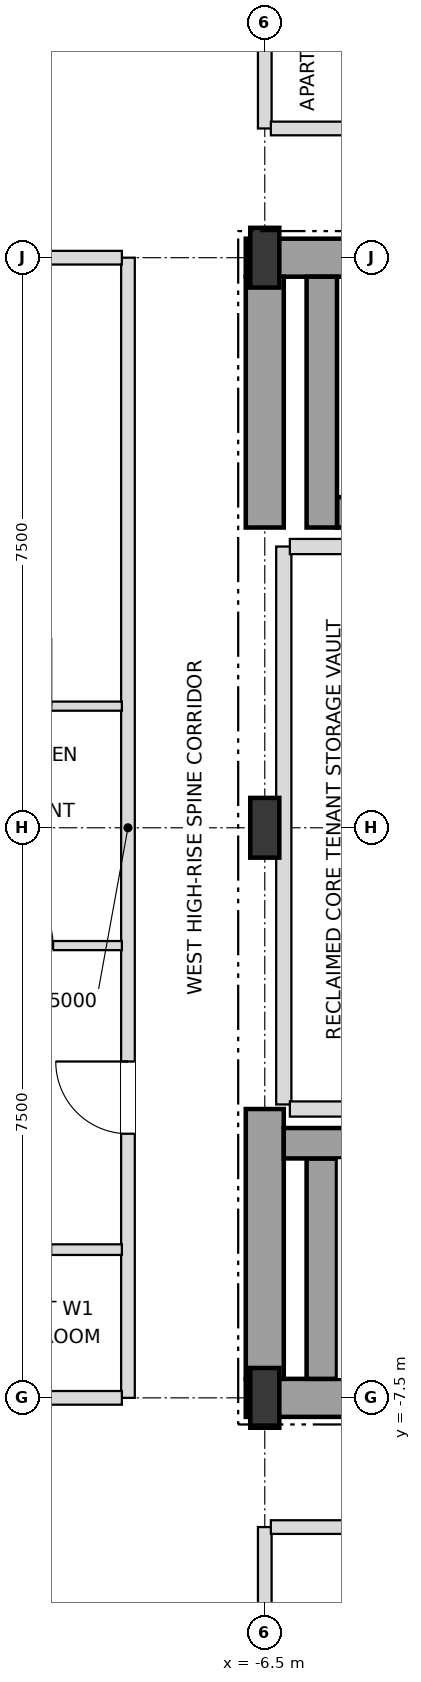
"""IFC4 building model, lengths in metres.
Left out: names, types, materials, properties, quantities, classifications, styles, units other than length and angle.
Written with IfcOpenShell. Run it as: python <this file> out.ifc"""

import sys

from ifc_helpers import new_model, si_unit, direction, frame, frame_2d, origin, origin_2d, place, context, subcontext, project, spatial, rectangle, i_section, extrude, element, fill, save


model = new_model("IFC4")
c1 = context("Model", 3, precision=1e-05, world=origin(), true_north=direction((0.0, 1.0)))
c2 = subcontext(c1, "Body", "Model", "MODEL_VIEW")
j1 = project(units=[si_unit("LENGTHUNIT", "METRE"), si_unit("PLANEANGLEUNIT", "RADIAN")], contexts=[c1])
p1 = place(None, origin())
s1 = spatial("IfcSite", under=j1, at=p1, CompositionType="ELEMENT")
p2 = place(p1, origin())
s2 = spatial("IfcBuilding", under=s1, at=p2, CompositionType="ELEMENT")
p3 = place(p2, frame((0.0, 0.0, 254.7)))
s3 = spatial("IfcBuildingStorey", under=s2, at=p3, CompositionType="ELEMENT", Elevation=254.7)
for number, where, z_axis, x_axis in (
    (1, (-6.5, -7.5, 0.0), (0.0, 0.0, 1.0), (1.0, 0.0, 0.0)),
    (2, (-6.5, 0.0, 0.0), (0.0, 0.0, 1.0), (1.0, 0.0, 0.0)),
    (3, (-6.5, 7.5, 0.0), (0.0, 0.0, 1.0), (1.0, 0.0, 0.0)),
):
    element("IfcColumn", number, at=place(p3, frame(where, z_axis=z_axis, x_axis=x_axis)), inside=s3, PredefinedType="COLUMN", context=c2, shape_type="SweptSolid", body=[
        extrude(i_section(OverallWidth=0.382, OverallDepth=0.786, WebThickness=0.02, FlangeThickness=0.033, at=origin_2d()), origin(), (0.0, 0.0, 1.0), 3.6),
    ])
p4 = place(p3, frame((-6.75, -7.5, 0.0), z_axis=(0.0, 0.0, 1.0), x_axis=(1.0, 0.0, 0.0)))
e4 = element("IfcWall", 4, at=p4, inside=s3, PredefinedType="SHEAR", context=c2, shape_type="SweptSolid", body=[
    extrude(rectangle(XDim=6.75, YDim=0.5, at=frame_2d((3.375, 0.0))), origin(), (0.0, 0.0, 1.0), 3.38),
])
p5 = place(p3, frame((-6.75, 7.5, 0.0), z_axis=(0.0, 0.0, 1.0), x_axis=(1.0, 0.0, 0.0)))
e5 = element("IfcWall", 5, at=p5, inside=s3, PredefinedType="SHEAR", context=c2, shape_type="SweptSolid", body=[
    extrude(rectangle(XDim=6.75, YDim=0.5, at=frame_2d((3.375, 0.0))), origin(), (0.0, 0.0, 1.0), 3.38),
])
p6 = place(p5, frame((1.65, 0.0, 0.0)))
e6 = element("IfcOpeningElement", 6, at=p6, cuts=e5, PredefinedType="OPENING", context=c2, shape_type="SweptSolid", body=[
    extrude(rectangle(XDim=1.05, YDim=2.15, at=frame_2d((0.525, 1.075))), frame((0.0, 0.26, 0.0), z_axis=(0.0, -1.0, 0.0), x_axis=(1.0, 0.0, 0.0)), (0.0, 0.0, 1.0), 0.52),
])
p7 = place(p3, frame((-6.5, -7.25, 0.0), z_axis=(0.0, 0.0, 1.0), x_axis=(0.0, 1.0, 0.0)))
e7 = element("IfcWall", 7, at=p7, inside=s3, PredefinedType="SHEAR", context=c2, shape_type="SweptSolid", body=[
    extrude(rectangle(XDim=3.55, YDim=0.5, at=frame_2d((1.775, 0.0))), origin(), (0.0, 0.0, 1.0), 3.38),
])
p8 = place(p3, frame((-6.5, 3.95, 0.0), z_axis=(0.0, 0.0, 1.0), x_axis=(0.0, 1.0, 0.0)))
e8 = element("IfcWall", 8, at=p8, inside=s3, PredefinedType="SHEAR", context=c2, shape_type="SweptSolid", body=[
    extrude(rectangle(XDim=3.3, YDim=0.5, at=frame_2d((1.65, 0.0))), origin(), (0.0, 0.0, 1.0), 3.38),
])
p9 = place(p3, frame((-5.75, -7.25, 0.0), z_axis=(0.0, 0.0, 1.0), x_axis=(0.0, 1.0, 0.0)))
e9 = element("IfcWall", 9, at=p9, inside=s3, PredefinedType="SHEAR", context=c2, shape_type="SweptSolid", body=[
    extrude(rectangle(XDim=2.9, YDim=0.4, at=frame_2d((1.45, 0.0))), origin(), (0.0, 0.0, 1.0), 3.38),
])
p10 = place(p3, frame((-6.25, -4.15, 0.0), z_axis=(0.0, 0.0, 1.0), x_axis=(1.0, 0.0, 0.0)))
e10 = element("IfcWall", 10, at=p10, inside=s3, PredefinedType="SHEAR", context=c2, shape_type="SweptSolid", body=[
    extrude(rectangle(XDim=7.78, YDim=0.4, at=frame_2d((3.89, 0.0))), origin(), (0.0, 0.0, 1.0), 3.38),
])
p11 = place(p3, frame((-5.55, 4.15, 0.0), z_axis=(0.0, 0.0, 1.0), x_axis=(1.0, 0.0, 0.0)))
e11 = element("IfcWall", 11, at=p11, inside=s3, PredefinedType="SHEAR", context=c2, shape_type="SweptSolid", body=[
    extrude(rectangle(XDim=7.08, YDim=0.4, at=frame_2d((3.54, 0.0))), origin(), (0.0, 0.0, 1.0), 3.38),
])
p12 = place(p3, frame((-5.75, 3.95, 0.0), z_axis=(0.0, 0.0, 1.0), x_axis=(0.0, 1.0, 0.0)))
e12 = element("IfcWall", 12, at=p12, inside=s3, PredefinedType="SHEAR", context=c2, shape_type="SweptSolid", body=[
    extrude(rectangle(XDim=3.3, YDim=0.4, at=frame_2d((1.65, 0.0))), origin(), (0.0, 0.0, 1.0), 3.38),
])
p13 = place(p3, frame((-8.3, -7.5, 0.0), z_axis=(0.0, 0.0, 1.0), x_axis=(0.0, 1.0, 0.0)))
e13 = element("IfcWall", 13, at=p13, inside=s3, PredefinedType="PARTITIONING", context=c2, shape_type="SweptSolid", body=[
    extrude(rectangle(XDim=15.0, YDim=0.18, at=frame_2d((7.5, 0.0))), origin(), (0.0, 0.0, 1.0), 3.38),
])
p14 = place(p13, frame((3.475, 0.0, 0.0)))
e14 = element("IfcOpeningElement", 14, at=p14, cuts=e13, PredefinedType="OPENING", context=c2, shape_type="SweptSolid", body=[
    extrude(rectangle(XDim=0.95, YDim=2.15, at=frame_2d((0.475, 1.075))), frame((0.0, 0.1, 0.0), z_axis=(0.0, -1.0, 0.0), x_axis=(1.0, 0.0, 0.0)), (0.0, 0.0, 1.0), 0.2),
])
for number, where, z_axis, x_axis in (
    (15, (-6.5, -19.9, 0.0), (0.0, 0.0, 1.0), (0.0, 1.0, 0.0)),
    (16, (-6.5, 9.2, 0.0), (0.0, 0.0, 1.0), (0.0, 1.0, 0.0)),
):
    element("IfcWall", number, at=place(p3, frame(where, z_axis=z_axis, x_axis=x_axis)), inside=s3, PredefinedType="PARTITIONING", context=c2, shape_type="SweptSolid", body=[
        extrude(rectangle(XDim=10.7, YDim=0.18, at=frame_2d((5.35, 0.0))), origin(), (0.0, 0.0, 1.0), 2.826),
    ])
p15 = place(p3, frame((-6.25, -3.64, 0.0), z_axis=(0.0, 0.0, 1.0), x_axis=(0.0, 1.0, 0.0)))
e17 = element("IfcWall", 17, at=p15, inside=s3, PredefinedType="SOLIDWALL", context=c2, shape_type="SweptSolid", body=[
    extrude(rectangle(XDim=7.34, YDim=0.2, at=frame_2d((3.67, 0.0))), origin(), (0.0, 0.0, 1.0), 3.38),
])
p16 = place(p3, frame((-6.42, -9.2, 0.0), z_axis=(0.0, 0.0, 1.0), x_axis=(1.0, 0.0, 0.0)))
e18 = element("IfcWall", 18, at=p16, inside=s3, PredefinedType="PARTITIONING", context=c2, shape_type="SweptSolid", body=[
    extrude(rectangle(XDim=5.19, YDim=0.18, at=frame_2d((2.595, 0.0))), origin(), (0.0, 0.0, 1.0), 3.38),
])
p17 = place(p16, frame((2.135, 0.0, 0.0)))
e19 = element("IfcOpeningElement", 19, at=p17, cuts=e18, PredefinedType="OPENING", context=c2, shape_type="SweptSolid", body=[
    extrude(rectangle(XDim=0.95, YDim=2.15, at=frame_2d((0.475, 1.075))), frame((0.0, 0.1, 0.0), z_axis=(0.0, -1.0, 0.0), x_axis=(1.0, 0.0, 0.0)), (0.0, 0.0, 1.0), 0.2),
])
p18 = place(p3, frame((-11.12, -7.5, 0.0), z_axis=(0.0, 0.0, 1.0), x_axis=(1.0, 0.0, 0.0)))
e20 = element("IfcWall", 20, at=p18, inside=s3, PredefinedType="PARTITIONING", context=c2, shape_type="SweptSolid", body=[
    extrude(rectangle(XDim=2.74, YDim=0.18, at=frame_2d((1.37, 0.0))), origin(), (0.0, 0.0, 1.0), 2.826),
])
p19 = place(p3, frame((-11.12, -5.55, 0.0), z_axis=(0.0, 0.0, 1.0), x_axis=(1.0, 0.0, 0.0)))
e21 = element("IfcWall", 21, at=p19, inside=s3, PredefinedType="PARTITIONING", context=c2, shape_type="SweptSolid", body=[
    extrude(rectangle(XDim=2.74, YDim=0.14, at=frame_2d((1.37, 0.0))), origin(), (0.0, 0.0, 1.0), 3.38),
])
p20 = place(p19, frame((0.91, 0.0, 0.0)))
e22 = element("IfcOpeningElement", 22, at=p20, cuts=e21, PredefinedType="OPENING", context=c2, shape_type="SweptSolid", body=[
    extrude(rectangle(XDim=0.9, YDim=2.1, at=frame_2d((0.45, 1.05))), frame((0.0, 0.08, 0.0), z_axis=(0.0, -1.0, 0.0), x_axis=(1.0, 0.0, 0.0)), (0.0, 0.0, 1.0), 0.16),
])
p21 = place(p3, frame((-6.17, -3.7, 0.0), z_axis=(0.0, 0.0, 1.0), x_axis=(1.0, 0.0, 0.0)))
e23 = element("IfcWall", 23, at=p21, inside=s3, PredefinedType="SOLIDWALL", context=c2, shape_type="SweptSolid", body=[
    extrude(rectangle(XDim=1.94, YDim=0.2, at=frame_2d((0.97, 0.0))), origin(), (0.0, 0.0, 1.0), 3.38),
])
p22 = place(p3, frame((-11.12, -1.55, 0.0), z_axis=(0.0, 0.0, 1.0), x_axis=(1.0, 0.0, 0.0)))
e24 = element("IfcWall", 24, at=p22, inside=s3, PredefinedType="PARTITIONING", context=c2, shape_type="SweptSolid", body=[
    extrude(rectangle(XDim=2.74, YDim=0.12, at=frame_2d((1.37, 0.0))), origin(), (0.0, 0.0, 1.0), 3.38),
])
p23 = place(p22, frame((0.885, 0.0, 0.0)))
e25 = element("IfcOpeningElement", 25, at=p23, cuts=e24, PredefinedType="OPENING", context=c2, shape_type="SweptSolid", body=[
    extrude(rectangle(XDim=0.95, YDim=2.1, at=frame_2d((0.475, 1.05))), frame((0.0, 0.07, 0.0), z_axis=(0.0, -1.0, 0.0), x_axis=(1.0, 0.0, 0.0)), (0.0, 0.0, 1.0), 0.14),
])
p24 = place(p3, frame((-11.12, 1.6, 0.0), z_axis=(0.0, 0.0, 1.0), x_axis=(1.0, 0.0, 0.0)))
e26 = element("IfcWall", 26, at=p24, inside=s3, PredefinedType="PARTITIONING", context=c2, shape_type="SweptSolid", body=[
    extrude(rectangle(XDim=2.74, YDim=0.12, at=frame_2d((1.37, 0.0))), origin(), (0.0, 0.0, 1.0), 3.38),
])
p25 = place(p24, frame((0.91, 0.0, 0.0)))
e27 = element("IfcOpeningElement", 27, at=p25, cuts=e26, PredefinedType="OPENING", context=c2, shape_type="SweptSolid", body=[
    extrude(rectangle(XDim=0.9, YDim=2.1, at=frame_2d((0.45, 1.05))), frame((0.0, 0.07, 0.0), z_axis=(0.0, -1.0, 0.0), x_axis=(1.0, 0.0, 0.0)), (0.0, 0.0, 1.0), 0.14),
])
p26 = place(p3, frame((-6.17, 3.7, 0.0), z_axis=(0.0, 0.0, 1.0), x_axis=(1.0, 0.0, 0.0)))
e28 = element("IfcWall", 28, at=p26, inside=s3, PredefinedType="SOLIDWALL", context=c2, shape_type="SweptSolid", body=[
    extrude(rectangle(XDim=1.94, YDim=0.2, at=frame_2d((0.97, 0.0))), origin(), (0.0, 0.0, 1.0), 3.38),
])
p27 = place(p3, frame((-11.12, 7.5, 0.0), z_axis=(0.0, 0.0, 1.0), x_axis=(1.0, 0.0, 0.0)))
e29 = element("IfcWall", 29, at=p27, inside=s3, PredefinedType="PARTITIONING", context=c2, shape_type="SweptSolid", body=[
    extrude(rectangle(XDim=2.74, YDim=0.18, at=frame_2d((1.37, 0.0))), origin(), (0.0, 0.0, 1.0), 2.826),
])
p28 = place(p3, frame((-6.42, 9.2, 0.0), z_axis=(0.0, 0.0, 1.0), x_axis=(1.0, 0.0, 0.0)))
e30 = element("IfcWall", 30, at=p28, inside=s3, PredefinedType="PARTITIONING", context=c2, shape_type="SweptSolid", body=[
    extrude(rectangle(XDim=1.79, YDim=0.18, at=frame_2d((0.895, 0.0))), origin(), (0.0, 0.0, 1.0), 3.38),
])
p29 = place(p14, origin())
e31 = element("IfcDoor", 31, at=p29, inside=s3, OperationType="SINGLE_SWING_RIGHT", PredefinedType="DOOR", context=c2, shape_type="SweptSolid", body=[
    extrude(rectangle(XDim=0.95, YDim=2.15, at=frame_2d((0.475, 1.075))), frame((0.0, 0.025, 0.0), z_axis=(0.0, -1.0, 0.0), x_axis=(1.0, 0.0, 0.0)), (0.0, 0.0, 1.0), 0.05),
])
fill(e14, e31)
p30 = place(p23, origin())
e32 = element("IfcDoor", 32, at=p30, inside=s3, OperationType="SINGLE_SWING_LEFT", PredefinedType="DOOR", context=c2, shape_type="SweptSolid", body=[
    extrude(rectangle(XDim=0.95, YDim=2.1, at=frame_2d((0.475, 1.05))), frame((0.0, 0.025, 0.0), z_axis=(0.0, -1.0, 0.0), x_axis=(1.0, 0.0, 0.0)), (0.0, 0.0, 1.0), 0.05),
])
fill(e25, e32)
save(model, sys.argv[1])
